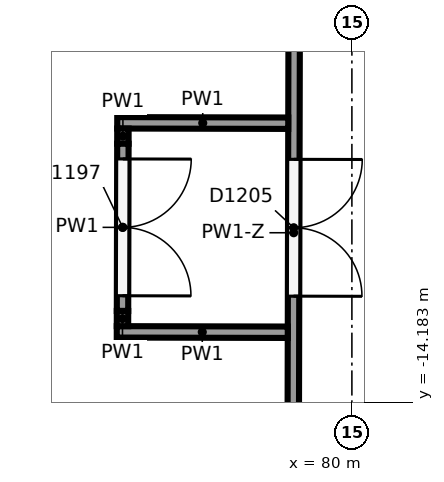
"""IFC4 building model, lengths in metres.
Left out: names, types, materials, properties, quantities, classifications, styles, units other than length and angle.
Written with IfcOpenShell. Run it as: python <this file> out.ifc"""

import sys

from ifc_helpers import new_model, si_unit, direction, frame, frame_2d, origin, place, context, subcontext, project, spatial, rectangle, extrude, element, fill, save


model = new_model("IFC4")
c1 = context("Model", 3, precision=1e-05, world=origin(), true_north=direction((0.0, 1.0)))
c2 = subcontext(c1, "Body", "Model", "MODEL_VIEW")
j1 = project(units=[si_unit("LENGTHUNIT", "METRE"), si_unit("PLANEANGLEUNIT", "RADIAN")], contexts=[c1])
p1 = place(None, origin())
s1 = spatial("IfcSite", under=j1, at=p1, CompositionType="ELEMENT")
p2 = place(p1, origin())
s2 = spatial("IfcBuilding", under=s1, at=p2, CompositionType="ELEMENT")
p3 = place(p2, frame((0.0, 0.0, 12.0)))
s3 = spatial("IfcBuildingStorey", under=s2, at=p3, CompositionType="ELEMENT", Elevation=12.0)
p4 = place(p3, frame((79.247, -6.537, 0.0), z_axis=(0.0, 0.0, 1.0), x_axis=(-0.002276512155, -0.999997408743, 0.0)))
e1 = element("IfcWall", 1, at=p4, inside=s3, PredefinedType="PARTITIONING", context=c2, shape_type="SweptSolid", body=[
    extrude(rectangle(XDim=10.832, YDim=0.15, at=frame_2d((5.416, 0.0))), origin(), (0.0, 0.0, 1.0), 4.124),
])
p5 = place(p4, frame((4.45, 0.0, 0.0)))
e2 = element("IfcOpeningElement", 2, at=p5, cuts=e1, PredefinedType="OPENING", context=c2, shape_type="SweptSolid", body=[
    extrude(rectangle(XDim=1.8, YDim=2.1, at=frame_2d((0.9, 1.05))), frame((0.0, 0.085, 0.0), z_axis=(0.0, -1.0, 0.0), x_axis=(1.0, 0.0, 0.0)), (0.0, 0.0, 1.0), 0.17),
])
for number, where, z_axis, x_axis in (
    (3, (79.163, -10.511, 0.0), (0.0, 0.0, 1.0), (-1.0, 0.002, 0.0)),
    (4, (79.156, -13.261, 0.0), (0.0, 0.0, 1.0), (-1.0, 0.002, 0.0)),
):
    element("IfcWall", number, at=place(p3, frame(where, z_axis=z_axis, x_axis=x_axis)), inside=s3, PredefinedType="PARTITIONING", context=c2, shape_type="SweptSolid", body=[
        extrude(rectangle(XDim=2.25, YDim=0.15, at=frame_2d((1.125, 0.0))), origin(), (0.0, 0.0, 1.0), 5.65),
    ])
p6 = place(p3, frame((76.988, -10.582, 0.0), z_axis=(0.0, 0.0, 1.0), x_axis=(-0.002441995161, -0.999997018325, 0.0)))
e5 = element("IfcWall", 5, at=p6, inside=s3, PredefinedType="PARTITIONING", context=c2, shape_type="SweptSolid", body=[
    extrude(rectangle(XDim=0.2, YDim=0.15, at=frame_2d((0.1, 0.0))), origin(), (0.0, 0.0, 1.0), 5.65),
])
p7 = place(p3, frame((76.987, -10.781, 0.0), z_axis=(0.0, 0.0, 1.0), x_axis=(-0.002330220038, -0.999997285034, 0.0)))
e6 = element("IfcWall", 6, at=p7, inside=s3, PredefinedType="PARTITIONING", context=c2, shape_type="SweptSolid", body=[
    extrude(rectangle(XDim=2.2, YDim=0.15, at=frame_2d((1.1, 0.0))), origin(), (0.0, 0.0, 1.0), 5.65),
])
p8 = place(p7, frame((0.2, 0.0, 0.0)))
e7 = element("IfcOpeningElement", 7, at=p8, cuts=e6, PredefinedType="OPENING", context=c2, shape_type="SweptSolid", body=[
    extrude(rectangle(XDim=1.8, YDim=2.1, at=frame_2d((0.9, 1.05))), frame((0.0, 0.085, 0.0), z_axis=(0.0, -1.0, 0.0), x_axis=(1.0, 0.0, 0.0)), (0.0, 0.0, 1.0), 0.17),
])
p9 = place(p3, frame((76.982, -12.982, 0.0), z_axis=(0.0, 0.0, 1.0), x_axis=(-0.002441995161, -0.999997018325, 0.0)))
e8 = element("IfcWall", 8, at=p9, inside=s3, PredefinedType="PARTITIONING", context=c2, shape_type="SweptSolid", body=[
    extrude(rectangle(XDim=0.2, YDim=0.15, at=frame_2d((0.1, 0.0))), origin(), (0.0, 0.0, 1.0), 5.65),
])
p10 = place(p5, origin())
e9 = element("IfcDoor", 9, at=p10, inside=s3, OperationType="DOUBLE_DOOR_SINGLE_SWING", PredefinedType="DOOR", context=c2, shape_type="SweptSolid", body=[
    extrude(rectangle(XDim=1.8, YDim=2.1, at=frame_2d((0.9, 1.05))), frame((0.0, 0.025, 0.0), z_axis=(0.0, -1.0, 0.0), x_axis=(1.0, 0.0, 0.0)), (0.0, 0.0, 1.0), 0.05),
])
fill(e2, e9)
p11 = place(p8, origin())
e10 = element("IfcDoor", 10, at=p11, inside=s3, OperationType="DOUBLE_DOOR_SINGLE_SWING", PredefinedType="DOOR", context=c2, shape_type="SweptSolid", body=[
    extrude(rectangle(XDim=1.8, YDim=2.1, at=frame_2d((0.9, 1.05))), frame((0.0, 0.025, 0.0), z_axis=(0.0, -1.0, 0.0), x_axis=(1.0, 0.0, 0.0)), (0.0, 0.0, 1.0), 0.05),
])
fill(e7, e10)
save(model, sys.argv[1])
